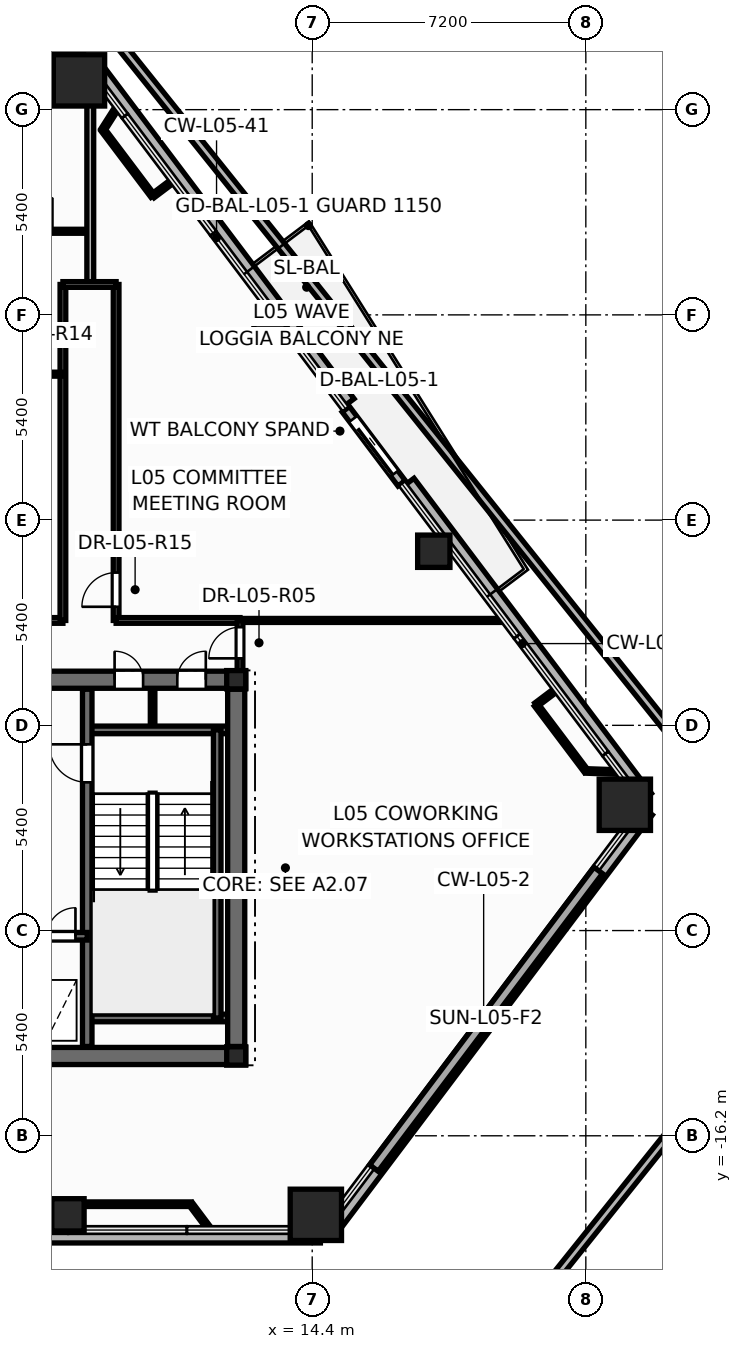
"""IFC4 building model, lengths in metres.
Left out: names, types, materials, properties, quantities, classifications, styles, units other than length and angle.
Written with IfcOpenShell. Run it as: python <this file> out.ifc"""

import sys

from ifc_helpers import new_model, si_unit, direction, frame, frame_2d, origin, origin_2d, place, context, subcontext, project, spatial, rectangle, hollow_rectangle, hollow_circle, i_section, extrude, element, fill, save


model = new_model("IFC4")
c1 = context("Model", 3, precision=1e-05, world=origin(), true_north=direction((0.0, 1.0)))
c2 = subcontext(c1, "Body", "Model", "MODEL_VIEW")
j1 = project(units=[si_unit("LENGTHUNIT", "METRE"), si_unit("PLANEANGLEUNIT", "RADIAN")], contexts=[c1])
p1 = place(None, origin())
s1 = spatial("IfcSite", under=j1, at=p1, CompositionType="ELEMENT")
p2 = place(p1, origin())
s2 = spatial("IfcBuilding", under=s1, at=p2, CompositionType="ELEMENT")
p3 = place(p2, frame((0.0, 0.0, 24.3)))
s3 = spatial("IfcBuildingStorey", under=s2, at=p3, CompositionType="ELEMENT", Elevation=24.3)
for number, where, z_axis, x_axis in (
    (1, (14.496, -18.28, 0.0), (0.0, 0.0, 1.0), (1.0, 0.0, 0.0)),
    (2, (22.626, -7.49, 0.0), (0.0, 0.0, 1.0), (1.0, 0.0, 0.0)),
    (3, (8.263, 11.57, 0.0), (0.0, 0.0, 1.0), (1.0, 0.0, 0.0)),
):
    element("IfcColumn", number, at=place(p3, frame(where, z_axis=z_axis, x_axis=x_axis)), inside=s3, PredefinedType="COLUMN", context=c2, shape_type="SweptSolid", body=[
        extrude(hollow_rectangle(XDim=1.35, YDim=1.35, WallThickness=0.065, at=origin_2d()), origin(), (0.0, 0.0, 1.0), 3.6),
    ])
for number, where, z_axis, x_axis in (
    (4, (7.973, -18.28, 0.0), (0.0, 0.0, 1.0), (1.0, 0.0, 0.0)),
    (5, (17.599, -0.819, 0.0), (0.0, 0.0, 1.0), (1.0, 0.0, 0.0)),
    (6, (13.29, 4.899, 0.0), (0.0, 0.0, 1.0), (1.0, 0.0, 0.0)),
):
    element("IfcColumn", number, at=place(p3, frame(where, z_axis=z_axis, x_axis=x_axis)), inside=s3, PredefinedType="COLUMN", context=c2, shape_type="SweptSolid", body=[
        extrude(hollow_circle(Radius=0.425, WallThickness=0.038, at=origin_2d()), origin(), (0.0, 0.0, 1.0), 3.6),
    ])
for number, where, z_axis, x_axis in (
    (7, (12.4, -14.1, 0.0), (0.0, 0.0, 1.0), (1.0, 0.0, 0.0)),
    (8, (12.4, -4.2, 0.0), (0.0, 0.0, 1.0), (1.0, 0.0, 0.0)),
):
    element("IfcColumn", number, at=place(p3, frame(where, z_axis=z_axis, x_axis=x_axis)), inside=s3, PredefinedType="COLUMN", context=c2, shape_type="SweptSolid", body=[
        extrude(i_section(OverallWidth=0.5, OverallDepth=0.482, WebThickness=0.04, FlangeThickness=0.045, at=origin_2d()), origin(), (0.0, 0.0, 1.0), 3.6),
    ])
p4 = place(p3, frame((20.205, -20.66, -0.02), z_axis=(0.0, 0.0, 1.0), x_axis=(0.625114512917, 0.780533052305, 0.0)))
e9 = element("IfcWall", 9, at=p4, inside=s3, PredefinedType="PARAPET", context=c2, shape_type="SweptSolid", body=[
    extrude(rectangle(XDim=12.561, YDim=0.22, at=frame_2d((6.28, 0.0))), origin(), (0.0, 0.0, 1.0), 1.17),
])
p5 = place(p3, frame((28.057, -10.856, -0.02), z_axis=(0.0, 0.0, 1.0), x_axis=(-0.625118708534, 0.780529692094, 0.0)))
e10 = element("IfcWall", 10, at=p5, inside=s3, PredefinedType="PARAPET", context=c2, shape_type="SweptSolid", body=[
    extrude(rectangle(XDim=32.25, YDim=0.22, at=frame_2d((16.125, 0.0))), origin(), (0.0, 0.0, 1.0), 1.17),
])
p6 = place(p3, frame((-14.615, -18.84, -0.2), z_axis=(0.0, 0.0, 1.0), x_axis=(1.0, 0.0, 0.0)))
e11 = element("IfcWall", 11, at=p6, inside=s3, PredefinedType="PARAPET", context=c2, shape_type="SweptSolid", body=[
    extrude(rectangle(XDim=29.231, YDim=0.36, at=frame_2d((14.615, 0.0))), origin(), (0.0, 0.0, 1.0), 0.38),
])
p7 = place(p3, frame((14.871, -18.712, -0.2), z_axis=(0.0, 0.0, 1.0), x_axis=(0.601806248796, 0.798642121923, 0.0)))
e12 = element("IfcWall", 12, at=p7, inside=s3, PredefinedType="PARAPET", context=c2, shape_type="SweptSolid", body=[
    extrude(rectangle(XDim=13.851, YDim=0.36, at=frame_2d((6.925, 0.0))), origin(), (0.0, 0.0, 1.0), 0.38),
])
p8 = place(p3, frame((23.183, -7.298, -0.2), z_axis=(0.0, 0.0, 1.0), x_axis=(-0.601808287056, 0.798640586015, 0.0)))
e13 = element("IfcWall", 13, at=p8, inside=s3, PredefinedType="PARAPET", context=c2, shape_type="SweptSolid", body=[
    extrude(rectangle(XDim=10.382, YDim=0.36, at=frame_2d((5.191, 0.0))), origin(), (0.0, 0.0, 1.0), 0.38),
])
p9 = place(p3, frame((15.358, 3.085, -0.2), z_axis=(0.0, 0.0, 1.0), x_axis=(-0.601810079758, 0.798639235138, 0.0)))
e14 = element("IfcWall", 14, at=p9, inside=s3, PredefinedType="PARAPET", context=c2, shape_type="SweptSolid", body=[
    extrude(rectangle(XDim=11.126, YDim=0.36, at=frame_2d((5.563, 0.0))), origin(), (0.0, 0.0, 1.0), 0.38),
])
p10 = place(p3, frame((8.383, 12.13, -0.2), z_axis=(0.0, 0.0, 1.0), x_axis=(-1.0, 0.0, 0.0)))
e15 = element("IfcWall", 15, at=p10, inside=s3, PredefinedType="PARAPET", context=c2, shape_type="SweptSolid", body=[
    extrude(rectangle(XDim=16.765, YDim=0.36, at=frame_2d((8.383, 0.0))), origin(), (0.0, 0.0, 1.0), 0.38),
])
p11 = place(p3, frame((16.753, 0.969, -0.015), z_axis=(0.0, 0.0, 1.0), x_axis=(-0.601871511513, 0.798592939882, 0.0)))
e16 = element("IfcWall", 16, at=p11, inside=s3, PredefinedType="STANDARD", context=c2, shape_type="SweptSolid", body=[
    extrude(rectangle(XDim=2.44, YDim=0.24, at=frame_2d((1.22, 0.0))), origin(), (0.0, 0.0, 1.0), 2.729),
])
p12 = place(p11, frame((0.32, 0.0, 0.015)))
e17 = element("IfcOpeningElement", 17, at=p12, cuts=e16, PredefinedType="OPENING", context=c2, shape_type="SweptSolid", body=[
    extrude(rectangle(XDim=1.806, YDim=2.204, at=frame_2d((0.9, 1.102))), frame((0.0, 0.13, 0.0), z_axis=(0.0, -1.0, 0.0), x_axis=(1.0, 0.0, 0.0)), (0.0, 0.0, 1.0), 0.26),
])
p13 = place(p3, frame((10.2, -5.52, 0.0), z_axis=(0.0, 0.0, 1.0), x_axis=(0.0, 1.0, 0.0)))
e18 = element("IfcWall", 18, at=p13, inside=s3, PredefinedType="PARTITIONING", context=c2, shape_type="SweptSolid", body=[
    extrude(rectangle(XDim=1.12, YDim=0.12, at=frame_2d((0.56, 0.0))), origin(), (0.0, 0.0, 1.0), 3.35),
])
p14 = place(p3, frame((-12.65, -14.1, 0.0), z_axis=(0.0, 0.0, 1.0), x_axis=(1.0, 0.0, 0.0)))
e19 = element("IfcWall", 19, at=p14, inside=s3, PredefinedType="SHEAR", context=c2, shape_type="SweptSolid", body=[
    extrude(rectangle(XDim=25.3, YDim=0.45, at=frame_2d((12.65, 0.0))), origin(), (0.0, 0.0, 1.0), 3.6),
])
p15 = place(p3, frame((-12.65, -4.2, 0.0), z_axis=(0.0, 0.0, 1.0), x_axis=(1.0, 0.0, 0.0)))
e20 = element("IfcWall", 20, at=p15, inside=s3, PredefinedType="SHEAR", context=c2, shape_type="SweptSolid", body=[
    extrude(rectangle(XDim=25.3, YDim=0.45, at=frame_2d((12.65, 0.0))), origin(), (0.0, 0.0, 1.0), 3.6),
])
p16 = place(p15, frame((0.95, 0.0, 0.0)))
e21 = element("IfcOpeningElement", 21, at=p16, cuts=e20, PredefinedType="OPENING", context=c2, shape_type="SweptSolid", body=[
    extrude(rectangle(XDim=0.756, YDim=2.054, at=frame_2d((0.375, 1.027))), frame((0.0, 0.235, 0.0), z_axis=(0.0, -1.0, 0.0), x_axis=(1.0, 0.0, 0.0)), (0.0, 0.0, 1.0), 0.47),
])
p17 = place(p15, frame((2.6, 0.0, 0.0)))
e22 = element("IfcOpeningElement", 22, at=p17, cuts=e20, PredefinedType="OPENING", context=c2, shape_type="SweptSolid", body=[
    extrude(rectangle(XDim=0.756, YDim=2.054, at=frame_2d((0.375, 1.027))), frame((0.0, 0.235, 0.0), z_axis=(0.0, -1.0, 0.0), x_axis=(1.0, 0.0, 0.0)), (0.0, 0.0, 1.0), 0.47),
])
p18 = place(p15, frame((21.85, 0.0, 0.0)))
e23 = element("IfcOpeningElement", 23, at=p18, cuts=e20, PredefinedType="OPENING", context=c2, shape_type="SweptSolid", body=[
    extrude(rectangle(XDim=0.756, YDim=2.054, at=frame_2d((0.375, 1.027))), frame((0.0, 0.235, 0.0), z_axis=(0.0, -1.0, 0.0), x_axis=(1.0, 0.0, 0.0)), (0.0, 0.0, 1.0), 0.47),
])
p19 = place(p15, frame((23.5, 0.0, 0.0)))
e24 = element("IfcOpeningElement", 24, at=p19, cuts=e20, PredefinedType="OPENING", context=c2, shape_type="SweptSolid", body=[
    extrude(rectangle(XDim=0.756, YDim=2.054, at=frame_2d((0.375, 1.027))), frame((0.0, 0.235, 0.0), z_axis=(0.0, -1.0, 0.0), x_axis=(1.0, 0.0, 0.0)), (0.0, 0.0, 1.0), 0.47),
])
p20 = place(p15, frame((5.85, 0.0, 0.0)))
e25 = element("IfcOpeningElement", 25, at=p20, cuts=e20, PredefinedType="OPENING", context=c2, shape_type="SweptSolid", body=[
    extrude(rectangle(XDim=1.006, YDim=2.104, at=frame_2d((0.5, 1.052))), frame((0.0, 0.235, 0.0), z_axis=(0.0, -1.0, 0.0), x_axis=(1.0, 0.0, 0.0)), (0.0, 0.0, 1.0), 0.47),
])
p21 = place(p15, frame((10.35, 0.0, 0.0)))
e26 = element("IfcOpeningElement", 26, at=p21, cuts=e20, PredefinedType="OPENING", context=c2, shape_type="SweptSolid", body=[
    extrude(rectangle(XDim=1.406, YDim=2.154, at=frame_2d((0.7, 1.077))), frame((0.0, 0.235, 0.0), z_axis=(0.0, -1.0, 0.0), x_axis=(1.0, 0.0, 0.0)), (0.0, 0.0, 1.0), 0.47),
])
p22 = place(p15, frame((18.45, 0.0, 0.0)))
e27 = element("IfcOpeningElement", 27, at=p22, cuts=e20, PredefinedType="OPENING", context=c2, shape_type="SweptSolid", body=[
    extrude(rectangle(XDim=1.006, YDim=2.104, at=frame_2d((0.5, 1.052))), frame((0.0, 0.235, 0.0), z_axis=(0.0, -1.0, 0.0), x_axis=(1.0, 0.0, 0.0)), (0.0, 0.0, 1.0), 0.47),
])
for number, where, z_axis, x_axis in (
    (28, (8.48, -5.52, 0.0), (0.0, 0.0, 1.0), (1.0, 0.0, 0.0)),
    (29, (8.48, -13.1, 0.0), (0.0, 0.0, 1.0), (1.0, 0.0, 0.0)),
):
    element("IfcWall", number, at=place(p3, frame(where, z_axis=z_axis, x_axis=x_axis)), inside=s3, PredefinedType="SOLIDWALL", context=c2, shape_type="SweptSolid", body=[
        extrude(rectangle(XDim=3.87, YDim=0.2, at=frame_2d((1.935, 0.0))), origin(), (0.0, 0.0, 1.0), 3.6),
    ])
p23 = place(p3, frame((11.9, -13.1, 0.0), z_axis=(0.0, 0.0, 1.0), x_axis=(0.0, 1.0, 0.0)))
e30 = element("IfcWall", 30, at=p23, inside=s3, PredefinedType="SOLIDWALL", context=c2, shape_type="SweptSolid", body=[
    extrude(rectangle(XDim=7.58, YDim=0.2, at=frame_2d((3.79, 0.0))), origin(), (0.0, 0.0, 1.0), 3.6),
])
p24 = place(p3, frame((8.48, -13.85, 0.0), z_axis=(0.0, 0.0, 1.0), x_axis=(0.0, 1.0, 0.0)))
e31 = element("IfcWall", 31, at=p24, inside=s3, PredefinedType="SHEAR", context=c2, shape_type="SweptSolid", body=[
    extrude(rectangle(XDim=9.4, YDim=0.25, at=frame_2d((4.7, 0.0))), origin(), (0.0, 0.0, 1.0), 3.6),
])
p25 = place(p24, frame((6.95, 0.0, 0.0)))
e32 = element("IfcOpeningElement", 32, at=p25, cuts=e31, PredefinedType="OPENING", context=c2, shape_type="SweptSolid", body=[
    extrude(rectangle(XDim=1.006, YDim=2.104, at=frame_2d((0.5, 1.052))), frame((0.0, 0.135, 0.0), z_axis=(0.0, -1.0, 0.0), x_axis=(1.0, 0.0, 0.0)), (0.0, 0.0, 1.0), 0.27),
])
p26 = place(p3, frame((5.12, -10.95, 0.0), z_axis=(0.0, 0.0, 1.0), x_axis=(1.0, 0.0, 0.0)))
e33 = element("IfcWall", 33, at=p26, inside=s3, PredefinedType="SOLIDWALL", context=c2, shape_type="SweptSolid", body=[
    extrude(rectangle(XDim=3.36, YDim=0.2, at=frame_2d((1.68, 0.0))), origin(), (0.0, 0.0, 1.0), 3.6),
])
p27 = place(p26, frame((0.42, 0.0, 0.0)))
e34 = element("IfcOpeningElement", 34, at=p27, cuts=e33, PredefinedType="OPENING", context=c2, shape_type="SweptSolid", body=[
    extrude(rectangle(XDim=1.106, YDim=2.104, at=frame_2d((0.55, 1.052))), frame((0.0, 0.11, 0.0), z_axis=(0.0, -1.0, 0.0), x_axis=(1.0, 0.0, 0.0)), (0.0, 0.0, 1.0), 0.22),
])
p28 = place(p26, frame((2.3, 0.0, 0.0)))
e35 = element("IfcOpeningElement", 35, at=p28, cuts=e33, PredefinedType="OPENING", context=c2, shape_type="SweptSolid", body=[
    extrude(rectangle(XDim=0.756, YDim=2.054, at=frame_2d((0.375, 1.027))), frame((0.0, 0.11, 0.0), z_axis=(0.0, -1.0, 0.0), x_axis=(1.0, 0.0, 0.0)), (0.0, 0.0, 1.0), 0.22),
])
p29 = place(p3, frame((12.4, -13.85, 0.0), z_axis=(0.0, 0.0, 1.0), x_axis=(0.0, 1.0, 0.0)))
e36 = element("IfcWall", 36, at=p29, inside=s3, PredefinedType="SHEAR", context=c2, shape_type="SweptSolid", body=[
    extrude(rectangle(XDim=9.4, YDim=0.45, at=frame_2d((4.7, 0.0))), origin(), (0.0, 0.0, 1.0), 3.6),
])
p30 = place(p3, frame((9.24, -2.64, 0.0), z_axis=(0.0, 0.0, 1.0), x_axis=(0.0, 1.0, 0.0)))
e37 = element("IfcWall", 37, at=p30, inside=s3, PredefinedType="PARTITIONING", context=c2, shape_type="SweptSolid", body=[
    extrude(rectangle(XDim=8.84, YDim=0.15, at=frame_2d((4.42, 0.0))), origin(), (0.0, 0.0, 1.0), 2.509),
])
p31 = place(p30, frame((0.359, 0.0, 0.0)))
e38 = element("IfcOpeningElement", 38, at=p31, cuts=e37, PredefinedType="OPENING", context=c2, shape_type="SweptSolid", body=[
    extrude(rectangle(XDim=0.906, YDim=2.104, at=frame_2d((0.45, 1.052))), frame((0.0, 0.085, 0.0), z_axis=(0.0, -1.0, 0.0), x_axis=(1.0, 0.0, 0.0)), (0.0, 0.0, 1.0), 0.17),
])
p32 = place(p3, frame((0.74, -2.64, 0.0), z_axis=(0.0, 0.0, 1.0), x_axis=(1.0, 0.0, 0.0)))
e39 = element("IfcWall", 39, at=p32, inside=s3, PredefinedType="PARTITIONING", context=c2, shape_type="SweptSolid", body=[
    extrude(rectangle(XDim=7.1, YDim=0.15, at=frame_2d((3.55, 0.0))), origin(), (0.0, 0.0, 1.0), 2.325),
])
p33 = place(p32, frame((0.72, 0.0, 0.0)))
e40 = element("IfcOpeningElement", 40, at=p33, cuts=e39, PredefinedType="OPENING", context=c2, shape_type="SweptSolid", body=[
    extrude(rectangle(XDim=0.906, YDim=2.104, at=frame_2d((0.45, 1.052))), frame((0.0, 0.085, 0.0), z_axis=(0.0, -1.0, 0.0), x_axis=(1.0, 0.0, 0.0)), (0.0, 0.0, 1.0), 0.17),
])
p34 = place(p3, frame((12.5, -2.64, 0.0), z_axis=(0.0, 0.0, 1.0), x_axis=(1.0, 0.0, 0.0)))
e41 = element("IfcWall", 41, at=p34, inside=s3, PredefinedType="PARTITIONING", context=c2, shape_type="SweptSolid", body=[
    extrude(rectangle(XDim=6.972, YDim=0.105, at=frame_2d((3.486, 0.0))), origin(), (0.0, 0.0, 1.0), 2.713),
])
p35 = place(p3, frame((7.84, -2.64, 0.0), z_axis=(0.0, 0.0, 1.0), x_axis=(0.0, 1.0, 0.0)))
e42 = element("IfcWall", 42, at=p35, inside=s3, PredefinedType="PARTITIONING", context=c2, shape_type="SweptSolid", body=[
    extrude(rectangle(XDim=8.84, YDim=0.15, at=frame_2d((4.42, 0.0))), origin(), (0.0, 0.0, 1.0), 2.509),
])
p36 = place(p3, frame((3.38, 7.6, 0.0), z_axis=(0.0, 0.0, 1.0), x_axis=(1.0, 0.0, 0.0)))
e43 = element("IfcWall", 43, at=p36, inside=s3, PredefinedType="PARTITIONING", context=c2, shape_type="SweptSolid", body=[
    extrude(rectangle(XDim=5.18, YDim=0.105, at=frame_2d((2.59, 0.0))), origin(), (0.0, 0.0, 1.0), 2.509),
])
p37 = place(p36, frame((3.304, 0.0, 0.0)))
e44 = element("IfcOpeningElement", 44, at=p37, cuts=e43, PredefinedType="OPENING", context=c2, shape_type="SweptSolid", body=[
    extrude(rectangle(XDim=0.886, YDim=2.104, at=frame_2d((0.44, 1.052))), frame((0.0, 0.062, 0.0), z_axis=(0.0, -1.0, 0.0), x_axis=(1.0, 0.0, 0.0)), (0.0, 0.0, 1.0), 0.125),
])
p38 = place(p3, frame((3.32, 3.84, 0.0), z_axis=(0.0, 0.0, 1.0), x_axis=(1.0, 0.0, 0.0)))
e45 = element("IfcWall", 45, at=p38, inside=s3, PredefinedType="PARTITIONING", context=c2, shape_type="SweptSolid", body=[
    extrude(rectangle(XDim=4.52, YDim=0.105, at=frame_2d((2.26, 0.0))), origin(), (0.0, 0.0, 1.0), 2.509),
])
p39 = place(p3, frame((8.56, 6.2, 0.0), z_axis=(0.0, 0.0, 1.0), x_axis=(0.0, 1.0, 0.0)))
e46 = element("IfcWall", 46, at=p39, inside=s3, PredefinedType="PARTITIONING", context=c2, shape_type="SweptSolid", body=[
    extrude(rectangle(XDim=5.641, YDim=0.18, at=frame_2d((2.821, 0.0))), origin(), (0.0, 0.0, 1.0), 2.509),
])
p40 = place(p3, frame((7.872, -18.0, 0.0), z_axis=(0.0, 0.0, 1.0), x_axis=(1.0, 0.0, 0.0)))
e47 = element("IfcWall", 47, at=p40, inside=s3, PredefinedType="PARTITIONING", context=c2, shape_type="SweptSolid", body=[
    extrude(rectangle(XDim=3.335, YDim=0.12, at=frame_2d((1.667, 0.0))), origin(), (0.0, 0.0, 1.0), 2.713),
])
p41 = place(p3, frame((9.24, -2.64, 0.0), z_axis=(0.0, 0.0, 1.0), x_axis=(1.0, 0.0, 0.0)))
e48 = element("IfcWall", 48, at=p41, inside=s3, PredefinedType="PARTITIONING", context=c2, shape_type="SweptSolid", body=[
    extrude(rectangle(XDim=3.26, YDim=0.15, at=frame_2d((1.63, 0.0))), origin(), (0.0, 0.0, 1.0), 3.35),
])
for number, where, z_axis, x_axis in (
    (49, (21.605, -6.6, 0.0), (0.0, 0.0, 1.0), (-0.602, 0.799, 0.0)),
    (50, (10.205, 8.529, 0.0), (0.0, 0.0, 1.0), (-0.602, 0.799, 0.0)),
):
    element("IfcWall", number, at=place(p3, frame(where, z_axis=z_axis, x_axis=x_axis)), inside=s3, PredefinedType="PARTITIONING", context=c2, shape_type="SweptSolid", body=[
        extrude(rectangle(XDim=2.18, YDim=0.12, at=frame_2d((1.09, 0.0))), origin(), (0.0, 0.0, 1.0), 3.35),
    ])
p42 = place(p3, frame((12.5, -4.24, 0.0), z_axis=(0.0, 0.0, 1.0), x_axis=(0.0, 1.0, 0.0)))
e51 = element("IfcWall", 51, at=p42, inside=s3, PredefinedType="PARTITIONING", context=c2, shape_type="SweptSolid", body=[
    extrude(rectangle(XDim=1.6, YDim=0.15, at=frame_2d((0.8, 0.0))), origin(), (0.0, 0.0, 1.0), 2.325),
])
p43 = place(p42, frame((0.602, 0.0, 0.0)))
e52 = element("IfcOpeningElement", 52, at=p43, cuts=e51, PredefinedType="OPENING", context=c2, shape_type="SweptSolid", body=[
    extrude(rectangle(XDim=0.826, YDim=2.104, at=frame_2d((0.41, 1.052))), frame((0.0, 0.085, 0.0), z_axis=(0.0, -1.0, 0.0), x_axis=(1.0, 0.0, 0.0)), (0.0, 0.0, 1.0), 0.17),
])
p44 = place(p3, frame((22.466, -6.63, 0.0), z_axis=(0.0, 0.0, 1.0), x_axis=(-0.999402630252, 0.034559841522, 0.0)))
e53 = element("IfcWall", 53, at=p44, inside=s3, PredefinedType="PARTITIONING", context=c2, shape_type="SweptSolid", body=[
    extrude(rectangle(XDim=0.862, YDim=0.12, at=frame_2d((0.431, 0.0))), origin(), (0.0, 0.0, 1.0), 2.713),
])
p45 = place(p3, frame((11.206, -18.0, 0.0), z_axis=(0.0, 0.0, 1.0), x_axis=(0.599813362113, -0.800139944404, 0.0)))
e54 = element("IfcWall", 54, at=p45, inside=s3, PredefinedType="PARTITIONING", context=c2, shape_type="SweptSolid", body=[
    extrude(rectangle(XDim=0.837, YDim=0.12, at=frame_2d((0.418, 0.0))), origin(), (0.0, 0.0, 1.0), 2.713),
])
p46 = place(p3, frame((7.84, 6.2, 0.0), z_axis=(0.0, 0.0, 1.0), x_axis=(1.0, 0.0, 0.0)))
e55 = element("IfcWall", 55, at=p46, inside=s3, PredefinedType="PARTITIONING", context=c2, shape_type="SweptSolid", body=[
    extrude(rectangle(XDim=1.4, YDim=0.15, at=frame_2d((0.7, 0.0))), origin(), (0.0, 0.0, 1.0), 3.35),
])
p47 = place(p3, frame((8.893, 10.27, 0.0), z_axis=(0.0, 0.0, 1.0), x_axis=(0.537493641355, 0.84326780177, 0.0)))
e56 = element("IfcWall", 56, at=p47, inside=s3, PredefinedType="PARTITIONING", context=c2, shape_type="SweptSolid", body=[
    extrude(rectangle(XDim=0.715, YDim=0.12, at=frame_2d((0.358, 0.0))), origin(), (0.0, 0.0, 1.0), 2.713),
])
p48 = place(p3, frame((20.293, -4.859, 0.0), z_axis=(0.0, 0.0, 1.0), x_axis=(0.798466789666, 0.602038857384, 0.0)))
e57 = element("IfcWall", 57, at=p48, inside=s3, PredefinedType="PARTITIONING", context=c2, shape_type="SweptSolid", body=[
    extrude(rectangle(XDim=0.67, YDim=0.12, at=frame_2d((0.335, 0.0))), origin(), (0.0, 0.0, 1.0), 2.713),
])
p49 = place(p3, frame((10.74, 8.932, 0.0), z_axis=(0.0, 0.0, 1.0), x_axis=(-0.798641978857, -0.601806438655, 0.0)))
e58 = element("IfcWall", 58, at=p49, inside=s3, PredefinedType="PARTITIONING", context=c2, shape_type="SweptSolid", body=[
    extrude(rectangle(XDim=0.67, YDim=0.12, at=frame_2d((0.335, 0.0))), origin(), (0.0, 0.0, 1.0), 2.713),
])
p50 = place(p3, frame((7.872, -18.67, 0.0), z_axis=(0.0, 0.0, 1.0), x_axis=(0.0, 1.0, 0.0)))
e59 = element("IfcWall", 59, at=p50, inside=s3, PredefinedType="PARTITIONING", context=c2, shape_type="SweptSolid", body=[
    extrude(rectangle(XDim=0.67, YDim=0.12, at=frame_2d((0.335, 0.0))), origin(), (0.0, 0.0, 1.0), 2.713),
])
p51 = place(p12, origin())
e60 = element("IfcDoor", 60, at=p51, inside=s3, OperationType="SLIDING_TO_LEFT", PredefinedType="DOOR", context=c2, shape_type="SweptSolid", body=[
    extrude(rectangle(XDim=1.8, YDim=2.2, at=frame_2d((0.9, 1.1))), frame((0.0, 0.025, 0.0), z_axis=(0.0, -1.0, 0.0), x_axis=(1.0, 0.0, 0.0)), (0.0, 0.0, 1.0), 0.05),
])
fill(e17, e60)
p52 = place(p25, origin())
e61 = element("IfcDoor", 61, at=p52, inside=s3, OperationType="SINGLE_SWING_RIGHT", PredefinedType="DOOR", context=c2, shape_type="SweptSolid", body=[
    extrude(rectangle(XDim=1.0, YDim=2.1, at=frame_2d((0.5, 1.05))), frame((0.0, 0.025, 0.0), z_axis=(0.0, -1.0, 0.0), x_axis=(1.0, 0.0, 0.0)), (0.0, 0.0, 1.0), 0.05),
])
fill(e32, e61)
p53 = place(p28, origin())
e62 = element("IfcDoor", 62, at=p53, inside=s3, OperationType="SINGLE_SWING_RIGHT", PredefinedType="DOOR", context=c2, shape_type="SweptSolid", body=[
    extrude(rectangle(XDim=0.75, YDim=2.05, at=frame_2d((0.375, 1.025))), frame((0.0, 0.025, 0.0), z_axis=(0.0, -1.0, 0.0), x_axis=(1.0, 0.0, 0.0)), (0.0, 0.0, 1.0), 0.05),
])
fill(e35, e62)
p54 = place(p18, origin())
e63 = element("IfcDoor", 63, at=p54, inside=s3, OperationType="SINGLE_SWING_LEFT", PredefinedType="DOOR", context=c2, shape_type="SweptSolid", body=[
    extrude(rectangle(XDim=0.75, YDim=2.05, at=frame_2d((0.375, 1.025))), frame((0.0, 0.025, 0.0), z_axis=(0.0, -1.0, 0.0), x_axis=(1.0, 0.0, 0.0)), (0.0, 0.0, 1.0), 0.05),
])
fill(e23, e63)
p55 = place(p19, origin())
e64 = element("IfcDoor", 64, at=p55, inside=s3, OperationType="SINGLE_SWING_RIGHT", PredefinedType="DOOR", context=c2, shape_type="SweptSolid", body=[
    extrude(rectangle(XDim=0.75, YDim=2.05, at=frame_2d((0.375, 1.025))), frame((0.0, 0.025, 0.0), z_axis=(0.0, -1.0, 0.0), x_axis=(1.0, 0.0, 0.0)), (0.0, 0.0, 1.0), 0.05),
])
fill(e24, e64)
p56 = place(p43, origin())
e65 = element("IfcDoor", 65, at=p56, inside=s3, OperationType="SINGLE_SWING_LEFT", PredefinedType="DOOR", context=c2, shape_type="SweptSolid", body=[
    extrude(rectangle(XDim=0.82, YDim=2.1, at=frame_2d((0.41, 1.05))), frame((0.0, 0.025, 0.0), z_axis=(0.0, -1.0, 0.0), x_axis=(1.0, 0.0, 0.0)), (0.0, 0.0, 1.0), 0.05),
])
fill(e52, e65)
p57 = place(p31, origin())
e66 = element("IfcDoor", 66, at=p57, inside=s3, OperationType="SINGLE_SWING_LEFT", PredefinedType="DOOR", context=c2, shape_type="SweptSolid", body=[
    extrude(rectangle(XDim=0.9, YDim=2.1, at=frame_2d((0.45, 1.05))), frame((0.0, 0.025, 0.0), z_axis=(0.0, -1.0, 0.0), x_axis=(1.0, 0.0, 0.0)), (0.0, 0.0, 1.0), 0.05),
])
fill(e38, e66)
save(model, sys.argv[1])
